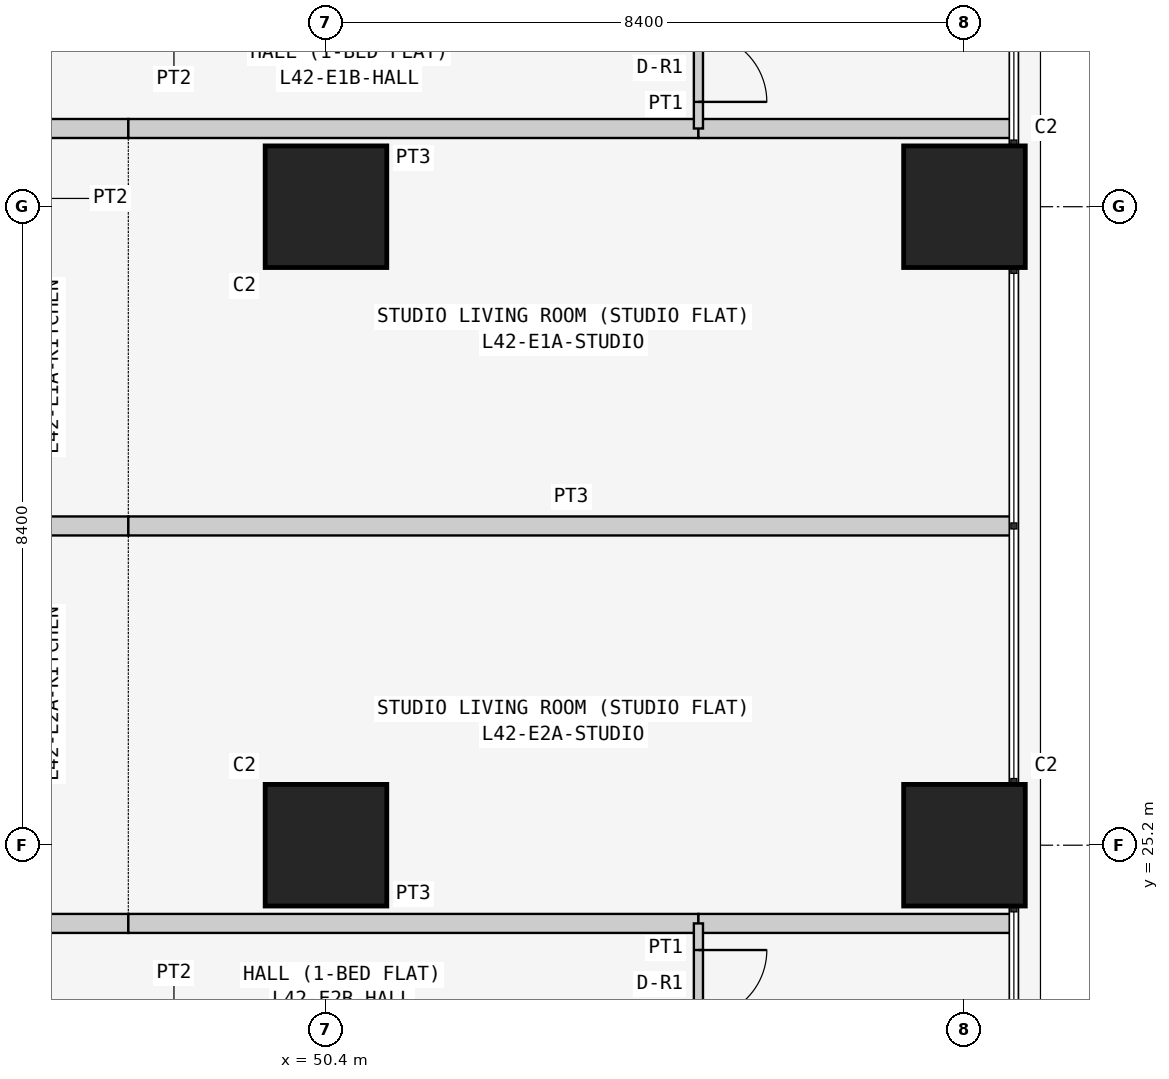
"""IFC4 building model, lengths in metres.
Left out: names, types, materials, properties, quantities, classifications, styles, units other than length and angle.
Written with IfcOpenShell. Run it as: python <this file> out.ifc"""

import sys

from ifc_helpers import new_model, si_unit, direction, frame, frame_2d, origin, origin_2d, place, context, subcontext, project, spatial, rectangle, extrude, element, fill, save


model = new_model("IFC4")
c1 = context("Model", 3, precision=1e-05, world=origin(), true_north=direction((0.0, 1.0)))
c2 = subcontext(c1, "Body", "Model", "MODEL_VIEW")
j1 = project(units=[si_unit("LENGTHUNIT", "METRE"), si_unit("PLANEANGLEUNIT", "RADIAN")], contexts=[c1])
p1 = place(None, origin())
s1 = spatial("IfcSite", under=j1, at=p1, CompositionType="ELEMENT")
p2 = place(p1, origin())
s2 = spatial("IfcBuilding", under=s1, at=p2, CompositionType="ELEMENT")
p3 = place(p2, frame((0.0, 0.0, 162.9)))
s3 = spatial("IfcBuildingStorey", under=s2, at=p3, CompositionType="ELEMENT", Elevation=162.9)
for number, where, z_axis, x_axis in (
    (1, (50.4, 25.2, 0.0), (0.0, 0.0, 1.0), (1.0, 0.0, 0.0)),
    (2, (50.4, 33.6, 0.0), (0.0, 0.0, 1.0), (1.0, 0.0, 0.0)),
    (3, (58.8, 25.2, 0.0), (0.0, 0.0, 1.0), (1.0, 0.0, 0.0)),
    (4, (58.8, 33.6, 0.0), (0.0, 0.0, 1.0), (1.0, 0.0, 0.0)),
):
    element("IfcColumn", number, at=place(p3, frame(where, z_axis=z_axis, x_axis=x_axis)), inside=s3, PredefinedType="COLUMN", context=c2, shape_type="SweptSolid", body=[
        extrude(rectangle(XDim=1.6, YDim=1.6, at=origin_2d()), origin(), (0.0, 0.0, 1.0), 3.6),
    ])
for number, where, z_axis, x_axis in (
    (5, (47.8, 34.629, 0.0), (0.0, 0.0, 1.0), (-1.0, 0.0, 0.0)),
    (6, (45.4, 29.4, 0.0), (0.0, 0.0, 1.0), (1.0, 0.0, 0.0)),
):
    element("IfcWall", number, at=place(p3, frame(where, z_axis=z_axis, x_axis=x_axis)), inside=s3, PredefinedType="PARTITIONING", context=c2, shape_type="SweptSolid", body=[
        extrude(rectangle(XDim=2.4, YDim=0.25, at=frame_2d((1.2, 0.0))), origin(), (0.0, 0.0, 1.0), 3.45),
    ])
p4 = place(p3, frame((55.3, 34.629, 0.0), z_axis=(0.0, 0.0, 1.0), x_axis=(-1.0, 0.0, 0.0)))
e7 = element("IfcWall", 7, at=p4, inside=s3, PredefinedType="PARTITIONING", context=c2, shape_type="SweptSolid", body=[
    extrude(rectangle(XDim=7.5, YDim=0.25, at=frame_2d((3.75, 0.0))), origin(), (0.0, 0.0, 1.0), 3.45),
])
p5 = place(p3, frame((59.45, 34.629, 0.0), z_axis=(0.0, 0.0, 1.0), x_axis=(-1.0, 0.0, 0.0)))
e8 = element("IfcWall", 8, at=p5, inside=s3, PredefinedType="PARTITIONING", context=c2, shape_type="SweptSolid", body=[
    extrude(rectangle(XDim=4.15, YDim=0.25, at=frame_2d((2.075, 0.0))), origin(), (0.0, 0.0, 1.0), 3.45),
])
p6 = place(p3, frame((47.8, 29.4, 0.0), z_axis=(0.0, 0.0, 1.0), x_axis=(1.0, 0.0, 0.0)))
e9 = element("IfcWall", 9, at=p6, inside=s3, PredefinedType="PARTITIONING", context=c2, shape_type="SweptSolid", body=[
    extrude(rectangle(XDim=11.65, YDim=0.25, at=frame_2d((5.825, 0.0))), origin(), (0.0, 0.0, 1.0), 3.45),
])
p7 = place(p3, frame((55.3, 34.629, 0.0), z_axis=(0.0, 0.0, 1.0), x_axis=(0.0, 1.0, 0.0)))
e10 = element("IfcWall", 10, at=p7, inside=s3, PredefinedType="PARTITIONING", context=c2, shape_type="SweptSolid", body=[
    extrude(rectangle(XDim=1.6, YDim=0.12, at=frame_2d((0.8, 0.0))), origin(), (0.0, 0.0, 1.0), 3.45),
])
p8 = place(p7, frame((0.35, 0.0, 0.0)))
e11 = element("IfcOpeningElement", 11, at=p8, cuts=e10, PredefinedType="OPENING", context=c2, shape_type="SweptSolid", body=[
    extrude(rectangle(XDim=0.9, YDim=2.1, at=frame_2d((0.45, 1.05))), frame((0.0, 0.07, 0.0), z_axis=(0.0, -1.0, 0.0), x_axis=(1.0, 0.0, 0.0)), (0.0, 0.0, 1.0), 0.14),
])
p9 = place(p3, frame((47.8, 24.171, 0.0), z_axis=(0.0, 0.0, 1.0), x_axis=(-1.0, 0.0, 0.0)))
e12 = element("IfcWall", 12, at=p9, inside=s3, PredefinedType="PARTITIONING", context=c2, shape_type="SweptSolid", body=[
    extrude(rectangle(XDim=2.4, YDim=0.25, at=frame_2d((1.2, 0.0))), origin(), (0.0, 0.0, 1.0), 3.45),
])
p10 = place(p3, frame((55.3, 24.171, 0.0), z_axis=(0.0, 0.0, 1.0), x_axis=(-1.0, 0.0, 0.0)))
e13 = element("IfcWall", 13, at=p10, inside=s3, PredefinedType="PARTITIONING", context=c2, shape_type="SweptSolid", body=[
    extrude(rectangle(XDim=7.5, YDim=0.25, at=frame_2d((3.75, 0.0))), origin(), (0.0, 0.0, 1.0), 3.45),
])
p11 = place(p3, frame((59.45, 24.171, 0.0), z_axis=(0.0, 0.0, 1.0), x_axis=(-1.0, 0.0, 0.0)))
e14 = element("IfcWall", 14, at=p11, inside=s3, PredefinedType="PARTITIONING", context=c2, shape_type="SweptSolid", body=[
    extrude(rectangle(XDim=4.15, YDim=0.25, at=frame_2d((2.075, 0.0))), origin(), (0.0, 0.0, 1.0), 3.45),
])
p12 = place(p3, frame((55.3, 24.171, 0.0), z_axis=(0.0, 0.0, 1.0), x_axis=(0.0, -1.0, 0.0)))
e15 = element("IfcWall", 15, at=p12, inside=s3, PredefinedType="PARTITIONING", context=c2, shape_type="SweptSolid", body=[
    extrude(rectangle(XDim=1.6, YDim=0.12, at=frame_2d((0.8, 0.0))), origin(), (0.0, 0.0, 1.0), 3.45),
])
p13 = place(p12, frame((0.35, 0.0, 0.0)))
e16 = element("IfcOpeningElement", 16, at=p13, cuts=e15, PredefinedType="OPENING", context=c2, shape_type="SweptSolid", body=[
    extrude(rectangle(XDim=0.9, YDim=2.1, at=frame_2d((0.45, 1.05))), frame((0.0, 0.07, 0.0), z_axis=(0.0, -1.0, 0.0), x_axis=(1.0, 0.0, 0.0)), (0.0, 0.0, 1.0), 0.14),
])
p14 = place(p8, frame((0.9, 0.0, 0.0), z_axis=(0.0, 0.0, 1.0), x_axis=(-1.0, 0.0, 0.0)))
e17 = element("IfcDoor", 17, at=p14, inside=s3, OperationType="SINGLE_SWING_RIGHT", PredefinedType="DOOR", context=c2, shape_type="SweptSolid", body=[
    extrude(rectangle(XDim=0.9, YDim=2.1, at=frame_2d((0.45, 1.05))), frame((0.0, 0.025, 0.0), z_axis=(0.0, -1.0, 0.0), x_axis=(1.0, 0.0, 0.0)), (0.0, 0.0, 1.0), 0.05),
])
fill(e11, e17)
p15 = place(p13, origin())
e18 = element("IfcDoor", 18, at=p15, inside=s3, OperationType="SINGLE_SWING_LEFT", PredefinedType="DOOR", context=c2, shape_type="SweptSolid", body=[
    extrude(rectangle(XDim=0.9, YDim=2.1, at=frame_2d((0.45, 1.05))), frame((0.0, 0.025, 0.0), z_axis=(0.0, -1.0, 0.0), x_axis=(1.0, 0.0, 0.0)), (0.0, 0.0, 1.0), 0.05),
])
fill(e16, e18)
save(model, sys.argv[1])
